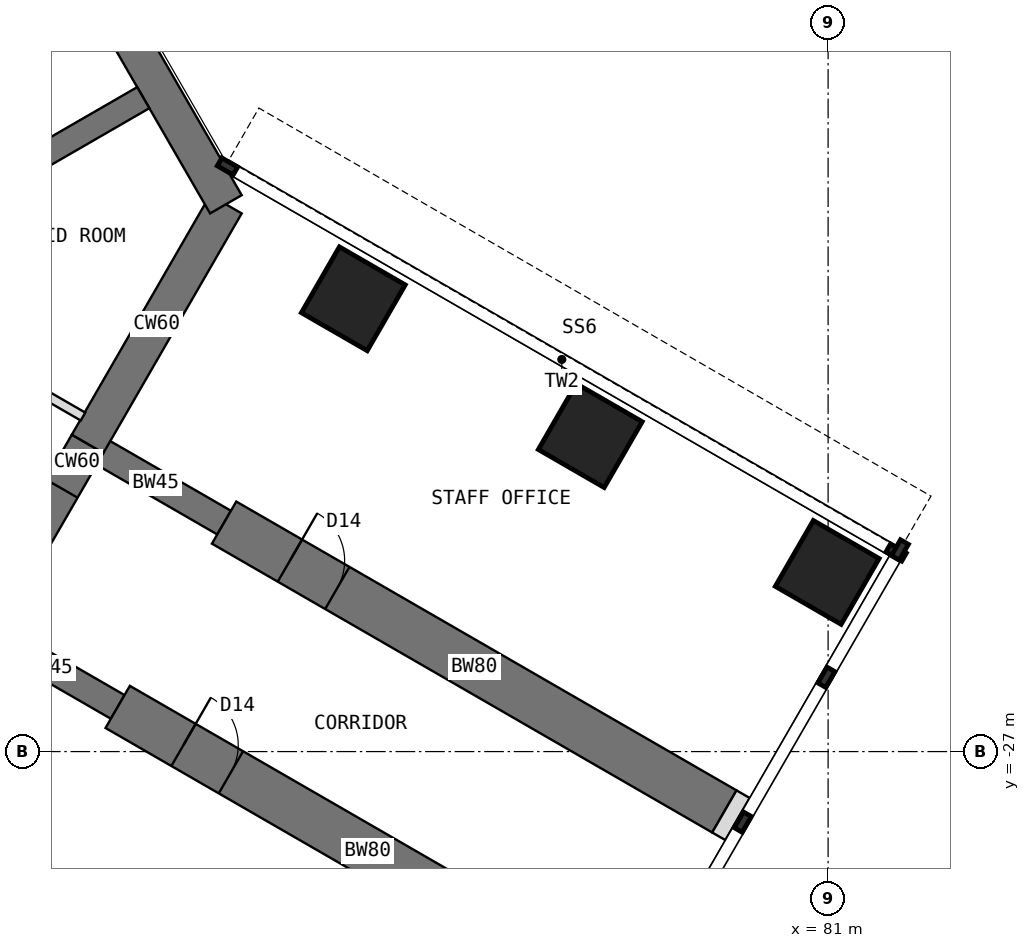
"""IFC4 building model, lengths in metres.
Left out: names, types, materials, properties, quantities, classifications, styles, units other than length and angle.
Written with IfcOpenShell. Run it as: python <this file> out.ifc"""

import sys

from ifc_helpers import new_model, si_unit, direction, frame, frame_2d, origin, origin_2d, place, context, subcontext, project, spatial, rectangle, extrude, element, fill, save


model = new_model("IFC4")
c1 = context("Model", 3, precision=1e-05, world=origin(), true_north=direction((0.0, 1.0)))
c2 = subcontext(c1, "Body", "Model", "MODEL_VIEW")
j1 = project(units=[si_unit("LENGTHUNIT", "METRE"), si_unit("PLANEANGLEUNIT", "RADIAN")], contexts=[c1])
p1 = place(None, origin())
s1 = spatial("IfcSite", under=j1, at=p1, CompositionType="ELEMENT")
p2 = place(p1, origin())
s2 = spatial("IfcBuilding", under=s1, at=p2, CompositionType="ELEMENT")
p3 = place(p2, frame((0.0, 0.0, 157.5)))
s3 = spatial("IfcBuildingStorey", under=s2, at=p3, CompositionType="ELEMENT", Elevation=157.5)
p4 = place(p3, frame((67.072, -24.97, 0.0), z_axis=(0.0, 0.0, 1.0), x_axis=(0.500010275428, 0.866019471182, 0.0)))
e1 = element("IfcWall", 1, at=p4, inside=s3, PredefinedType="SHEAR", context=c2, shape_type="SweptSolid", body=[
    extrude(rectangle(XDim=3.5, YDim=0.6, at=frame_2d((1.75, 0.0))), origin(), (0.0, 0.0, 1.0), 4.0),
])
p5 = place(p4, frame((0.85, 0.0, 0.0)))
e2 = element("IfcOpeningElement", 2, at=p5, cuts=e1, PredefinedType="OPENING", context=c2, shape_type="SweptSolid", body=[
    extrude(rectangle(XDim=1.8, YDim=2.1, at=frame_2d((0.9, 1.05))), frame((0.0, 0.31, 0.0), z_axis=(0.0, -1.0, 0.0), x_axis=(1.0, 0.0, 0.0)), (0.0, 0.0, 1.0), 0.62),
])
p6 = place(p3, frame((68.822, -21.939, 0.0), z_axis=(0.0, 0.0, 1.0), x_axis=(0.500024481964, 0.866011268655, 0.0)))
e3 = element("IfcWall", 3, at=p6, inside=s3, PredefinedType="SHEAR", context=c2, shape_type="SweptSolid", body=[
    extrude(rectangle(XDim=4.548, YDim=0.6, at=frame_2d((2.274, 0.0))), origin(), (0.0, 0.0, 1.0), 4.0),
])
p7 = place(p3, frame((71.096, -18.0, 0.0), z_axis=(0.0, 0.0, 1.0), x_axis=(-0.500005998175, 0.866021940709, 0.0)))
e4 = element("IfcWall", 4, at=p7, inside=s3, PredefinedType="SHEAR", context=c2, shape_type="SweptSolid", body=[
    extrude(rectangle(XDim=12.596, YDim=0.6, at=frame_2d((6.298, 0.0))), origin(), (0.0, 0.0, 1.0), 4.0),
])
p8 = place(p3, frame((68.822, -21.939, 0.0), z_axis=(0.0, 0.0, 1.0), x_axis=(0.866072649678, -0.499918158782, 0.0)))
e5 = element("IfcWall", 5, at=p8, inside=s3, PredefinedType="SHEAR", context=c2, shape_type="SweptSolid", body=[
    extrude(rectangle(XDim=2.592, YDim=0.45, at=frame_2d((1.296, 0.0))), origin(), (0.0, 0.0, 1.0), 4.0),
])
p9 = place(p3, frame((71.066, -23.234, 0.0), z_axis=(0.0, 0.0, 1.0), x_axis=(0.86602681393, -0.499997557548, 0.0)))
e6 = element("IfcWall", 6, at=p9, inside=s3, PredefinedType="SHEAR", context=c2, shape_type="SweptSolid", body=[
    extrude(rectangle(XDim=9.5, YDim=0.8, at=frame_2d((4.75, 0.0))), origin(), (0.0, 0.0, 1.0), 4.0),
])
p10 = place(p9, frame((1.25, 0.0, 0.0)))
e7 = element("IfcOpeningElement", 7, at=p10, cuts=e6, PredefinedType="OPENING", context=c2, shape_type="SweptSolid", body=[
    extrude(rectangle(XDim=0.9, YDim=2.1, at=frame_2d((0.45, 1.05))), frame((0.0, 0.41, 0.0), z_axis=(0.0, -1.0, 0.0), x_axis=(1.0, 0.0, 0.0)), (0.0, 0.0, 1.0), 0.82),
])
p11 = place(p3, frame((67.072, -24.97, 0.0), z_axis=(0.0, 0.0, 1.0), x_axis=(0.866031863473, -0.499988811324, 0.0)))
e8 = element("IfcWall", 8, at=p11, inside=s3, PredefinedType="SHEAR", context=c2, shape_type="SweptSolid", body=[
    extrude(rectangle(XDim=2.592, YDim=0.45, at=frame_2d((1.296, 0.0))), origin(), (0.0, 0.0, 1.0), 4.0),
])
p12 = place(p3, frame((69.316, -26.266, 0.0), z_axis=(0.0, 0.0, 1.0), x_axis=(0.86602681393, -0.499997557548, 0.0)))
e9 = element("IfcWall", 9, at=p12, inside=s3, PredefinedType="SHEAR", context=c2, shape_type="SweptSolid", body=[
    extrude(rectangle(XDim=9.5, YDim=0.8, at=frame_2d((4.75, 0.0))), origin(), (0.0, 0.0, 1.0), 4.0),
])
p13 = place(p12, frame((1.25, 0.0, 0.0)))
e10 = element("IfcOpeningElement", 10, at=p13, cuts=e9, PredefinedType="OPENING", context=c2, shape_type="SweptSolid", body=[
    extrude(rectangle(XDim=0.9, YDim=2.1, at=frame_2d((0.45, 1.05))), frame((0.0, 0.41, 0.0), z_axis=(0.0, -1.0, 0.0), x_axis=(1.0, 0.0, 0.0)), (0.0, 0.0, 1.0), 0.82),
])
for number, where, z_axis, x_axis in (
    (11, (73.191, -19.554, 0.0), (0.0, 0.0, 1.0), (0.5, 0.866, 0.0)),
    (12, (77.088, -21.804, 0.0), (0.0, 0.0, 1.0), (0.5, 0.866, 0.0)),
    (13, (80.986, -24.054, 0.0), (0.0, 0.0, 1.0), (0.5, 0.866, 0.0)),
):
    element("IfcColumn", number, at=place(p3, frame(where, z_axis=z_axis, x_axis=x_axis)), inside=s3, PredefinedType="COLUMN", context=c2, shape_type="SweptSolid", body=[
        extrude(rectangle(XDim=1.25, YDim=1.25, at=origin_2d()), origin(), (0.0, 0.0, 1.0), 4.0),
    ])
p14 = place(p3, frame((79.294, -27.984, 0.0), z_axis=(0.0, 0.0, 1.0), x_axis=(0.865827443207, -0.500342721131, 0.0)))
e14 = element("IfcWall", 14, at=p14, inside=s3, PredefinedType="PARTITIONING", context=c2, shape_type="SweptSolid", body=[
    extrude(rectangle(XDim=0.25, YDim=0.8, at=frame_2d((0.125, 0.0))), origin(), (0.0, 0.0, 1.0), 3.8),
])
p15 = place(p3, frame((64.62, -19.201, 0.0), z_axis=(0.0, 0.0, 1.0), x_axis=(0.866027317282, 0.49999668571, 0.0)))
e15 = element("IfcWall", 15, at=p15, inside=s3, PredefinedType="SHEAR", context=c2, shape_type="SweptSolid", body=[
    extrude(rectangle(XDim=5.908, YDim=0.4, at=frame_2d((2.954, 0.0))), origin(), (0.0, 0.0, 1.0), 4.0),
])
p16 = place(p3, frame((64.87, -19.253, 0.0), z_axis=(0.0, 0.0, 1.0), x_axis=(0.866025707867, -0.499999473313, 0.0)))
e16 = element("IfcWall", 16, at=p16, inside=s3, PredefinedType="PARTITIONING", context=c2, shape_type="SweptSolid", body=[
    extrude(rectangle(XDim=4.476, YDim=0.15, at=frame_2d((2.238, 0.0))), origin(), (0.0, 0.0, 1.0), 3.8),
])
p17 = place(p16, frame((0.843, 0.0, 0.0)))
e17 = element("IfcOpeningElement", 17, at=p17, cuts=e16, PredefinedType="OPENING", context=c2, shape_type="SweptSolid", body=[
    extrude(rectangle(XDim=1.0, YDim=2.1, at=frame_2d((0.5, 1.05))), frame((0.0, 0.085, 0.0), z_axis=(0.0, -1.0, 0.0), x_axis=(1.0, 0.0, 0.0)), (0.0, 0.0, 1.0), 0.17),
])
p18 = place(p5, origin())
e18 = element("IfcDoor", 18, at=p18, inside=s3, OperationType="DOUBLE_DOOR_DOUBLE_SWING", PredefinedType="DOOR", context=c2, shape_type="SweptSolid", body=[
    extrude(rectangle(XDim=1.72, YDim=2.06, at=frame_2d((0.9, 1.03))), frame((0.0, 0.025, 0.0), z_axis=(0.0, -1.0, 0.0), x_axis=(1.0, 0.0, 0.0)), (0.0, 0.0, 1.0), 0.05),
    extrude(rectangle(XDim=0.04, YDim=2.1, at=frame_2d((0.02, 1.05))), frame((0.0, 0.3, 0.0), z_axis=(0.0, -1.0, 0.0), x_axis=(1.0, 0.0, 0.0)), (0.0, 0.0, 1.0), 0.6),
    extrude(rectangle(XDim=0.04, YDim=2.1, at=frame_2d((1.78, 1.05))), frame((0.0, 0.3, 0.0), z_axis=(0.0, -1.0, 0.0), x_axis=(1.0, 0.0, 0.0)), (0.0, 0.0, 1.0), 0.6),
    extrude(rectangle(XDim=1.72, YDim=0.04, at=frame_2d((0.9, 2.08))), frame((0.0, 0.3, 0.0), z_axis=(0.0, -1.0, 0.0), x_axis=(1.0, 0.0, 0.0)), (0.0, 0.0, 1.0), 0.6),
])
fill(e2, e18)
p19 = place(p10, origin())
e19 = element("IfcDoor", 19, at=p19, inside=s3, OperationType="SINGLE_SWING_LEFT", PredefinedType="DOOR", context=c2, shape_type="SweptSolid", body=[
    extrude(rectangle(XDim=0.82, YDim=2.06, at=frame_2d((0.45, 1.03))), frame((0.0, 0.025, 0.0), z_axis=(0.0, -1.0, 0.0), x_axis=(1.0, 0.0, 0.0)), (0.0, 0.0, 1.0), 0.05),
    extrude(rectangle(XDim=0.04, YDim=2.1, at=frame_2d((0.02, 1.05))), frame((0.0, 0.4, 0.0), z_axis=(0.0, -1.0, 0.0), x_axis=(1.0, 0.0, 0.0)), (0.0, 0.0, 1.0), 0.8),
    extrude(rectangle(XDim=0.04, YDim=2.1, at=frame_2d((0.88, 1.05))), frame((0.0, 0.4, 0.0), z_axis=(0.0, -1.0, 0.0), x_axis=(1.0, 0.0, 0.0)), (0.0, 0.0, 1.0), 0.8),
    extrude(rectangle(XDim=0.82, YDim=0.04, at=frame_2d((0.45, 2.08))), frame((0.0, 0.4, 0.0), z_axis=(0.0, -1.0, 0.0), x_axis=(1.0, 0.0, 0.0)), (0.0, 0.0, 1.0), 0.8),
])
fill(e7, e19)
p20 = place(p13, origin())
e20 = element("IfcDoor", 20, at=p20, inside=s3, OperationType="SINGLE_SWING_LEFT", PredefinedType="DOOR", context=c2, shape_type="SweptSolid", body=[
    extrude(rectangle(XDim=0.82, YDim=2.06, at=frame_2d((0.45, 1.03))), frame((0.0, 0.025, 0.0), z_axis=(0.0, -1.0, 0.0), x_axis=(1.0, 0.0, 0.0)), (0.0, 0.0, 1.0), 0.05),
    extrude(rectangle(XDim=0.04, YDim=2.1, at=frame_2d((0.02, 1.05))), frame((0.0, 0.4, 0.0), z_axis=(0.0, -1.0, 0.0), x_axis=(1.0, 0.0, 0.0)), (0.0, 0.0, 1.0), 0.8),
    extrude(rectangle(XDim=0.04, YDim=2.1, at=frame_2d((0.88, 1.05))), frame((0.0, 0.4, 0.0), z_axis=(0.0, -1.0, 0.0), x_axis=(1.0, 0.0, 0.0)), (0.0, 0.0, 1.0), 0.8),
    extrude(rectangle(XDim=0.82, YDim=0.04, at=frame_2d((0.45, 2.08))), frame((0.0, 0.4, 0.0), z_axis=(0.0, -1.0, 0.0), x_axis=(1.0, 0.0, 0.0)), (0.0, 0.0, 1.0), 0.8),
])
fill(e10, e20)
save(model, sys.argv[1])
